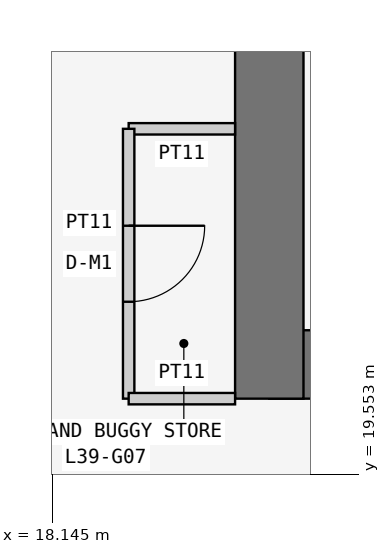
"""IFC4 building model, lengths in metres.
Left out: names, types, materials, properties, quantities, classifications, styles, units other than length and angle.
Written with IfcOpenShell. Run it as: python <this file> out.ifc"""

import sys

from ifc_helpers import new_model, si_unit, direction, frame, frame_2d, origin, place, context, subcontext, project, spatial, rectangle, extrude, element, fill, save


model = new_model("IFC4")
c1 = context("Model", 3, precision=1e-05, world=origin(), true_north=direction((0.0, 1.0)))
c2 = subcontext(c1, "Body", "Model", "MODEL_VIEW")
j1 = project(units=[si_unit("LENGTHUNIT", "METRE"), si_unit("PLANEANGLEUNIT", "RADIAN")], contexts=[c1])
p1 = place(None, origin())
s1 = spatial("IfcSite", under=j1, at=p1, CompositionType="ELEMENT")
p2 = place(p1, origin())
s2 = spatial("IfcBuilding", under=s1, at=p2, CompositionType="ELEMENT")
p3 = place(p2, frame((0.0, 0.0, 152.1)))
s3 = spatial("IfcBuildingStorey", under=s2, at=p3, CompositionType="ELEMENT", Elevation=152.1)
p4 = place(p3, frame((21.0, 21.0, 0.0), z_axis=(0.0, 0.0, 1.0), x_axis=(1.0, 0.0, 0.0)))
e1 = element("IfcWall", 1, at=p4, inside=s3, PredefinedType="SHEAR", context=c2, shape_type="SweptSolid", body=[
    extrude(rectangle(XDim=17.25, YDim=0.9, at=frame_2d((8.625, 0.0))), origin(), (0.0, 0.0, 1.0), 3.6),
])
p5 = place(p3, frame((21.0, 37.8, 0.0), z_axis=(0.0, 0.0, 1.0), x_axis=(0.0, -1.0, 0.0)))
e2 = element("IfcWall", 2, at=p5, inside=s3, PredefinedType="SHEAR", context=c2, shape_type="SweptSolid", body=[
    extrude(rectangle(XDim=17.25, YDim=0.9, at=frame_2d((8.625, 0.0))), origin(), (0.0, 0.0, 1.0), 3.6),
])
p6 = place(p5, frame((5.4, 0.0, 0.0)))
e3 = element("IfcOpeningElement", 3, at=p6, cuts=e2, PredefinedType="OPENING", context=c2, shape_type="SweptSolid", body=[
    extrude(rectangle(XDim=1.2, YDim=2.1, at=frame_2d((0.6, 1.05))), frame((0.0, 0.46, 0.0), z_axis=(0.0, -1.0, 0.0), x_axis=(1.0, 0.0, 0.0)), (0.0, 0.0, 1.0), 0.92),
])
p7 = place(p3, frame((20.55, 24.1, 0.0), z_axis=(0.0, 0.0, 1.0), x_axis=(-1.0, 0.0, 0.0)))
e4 = element("IfcWall", 4, at=p7, inside=s3, PredefinedType="PARTITIONING", context=c2, shape_type="SweptSolid", body=[
    extrude(rectangle(XDim=1.4, YDim=0.15, at=frame_2d((0.7, 0.0))), origin(), (0.0, 0.0, 1.0), 3.45),
])
p8 = place(p3, frame((19.15, 24.1, 0.0), z_axis=(0.0, 0.0, 1.0), x_axis=(0.0, -1.0, 0.0)))
e5 = element("IfcWall", 5, at=p8, inside=s3, PredefinedType="PARTITIONING", context=c2, shape_type="SweptSolid", body=[
    extrude(rectangle(XDim=3.55, YDim=0.15, at=frame_2d((1.775, 0.0))), origin(), (0.0, 0.0, 1.0), 3.45),
])
p9 = place(p8, frame((1.275, 0.0, 0.0)))
e6 = element("IfcOpeningElement", 6, at=p9, cuts=e5, PredefinedType="OPENING", context=c2, shape_type="SweptSolid", body=[
    extrude(rectangle(XDim=1.0, YDim=2.1, at=frame_2d((0.5, 1.05))), frame((0.0, 0.085, 0.0), z_axis=(0.0, -1.0, 0.0), x_axis=(1.0, 0.0, 0.0)), (0.0, 0.0, 1.0), 0.17),
])
p10 = place(p3, frame((19.15, 20.55, 0.0), z_axis=(0.0, 0.0, 1.0), x_axis=(1.0, 0.0, 0.0)))
e7 = element("IfcWall", 7, at=p10, inside=s3, PredefinedType="PARTITIONING", context=c2, shape_type="SweptSolid", body=[
    extrude(rectangle(XDim=1.4, YDim=0.15, at=frame_2d((0.7, 0.0))), origin(), (0.0, 0.0, 1.0), 3.45),
])
p11 = place(p9, origin())
e8 = element("IfcDoor", 8, at=p11, inside=s3, OperationType="SINGLE_SWING_LEFT", PredefinedType="DOOR", context=c2, shape_type="SweptSolid", body=[
    extrude(rectangle(XDim=1.0, YDim=2.1, at=frame_2d((0.5, 1.05))), frame((0.0, 0.025, 0.0), z_axis=(0.0, -1.0, 0.0), x_axis=(1.0, 0.0, 0.0)), (0.0, 0.0, 1.0), 0.05),
])
fill(e6, e8)
save(model, sys.argv[1])
